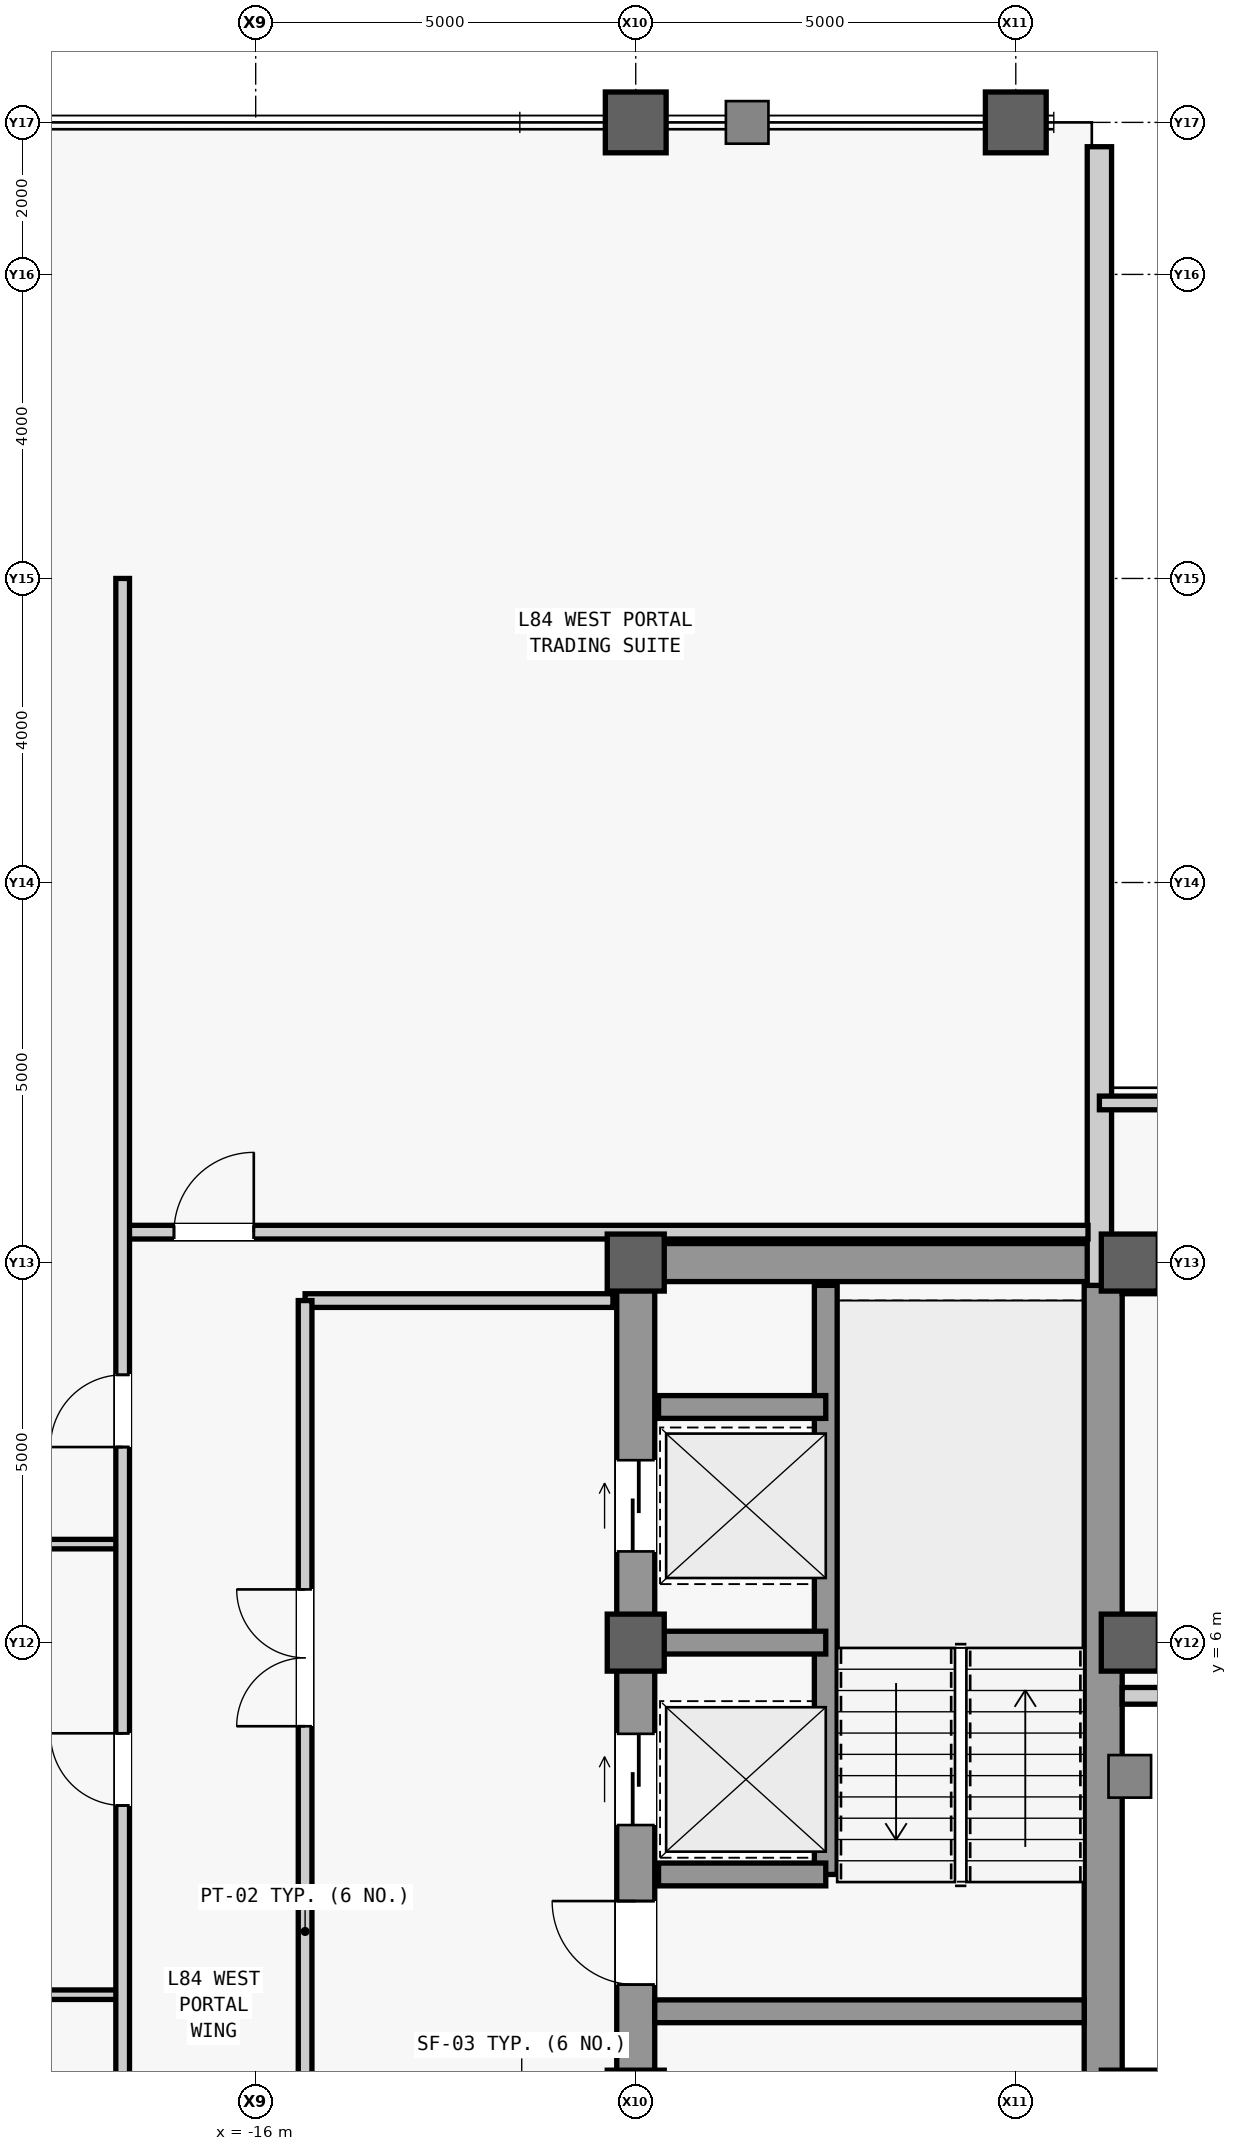
"""IFC4 building model, lengths in metres.
Left out: names, types, materials, properties, quantities, classifications, styles, units other than length and angle.
Written with IfcOpenShell. Run it as: python <this file> out.ifc"""

import sys

from ifc_helpers import new_model, si_unit, direction, frame, frame_2d, origin, origin_2d, place, context, subcontext, project, spatial, rectangle, hollow_rectangle, extrude, source, transform, mapped, element, fill, save


model = new_model("IFC4")
c1 = context("Model", 3, precision=1e-05, world=origin(), true_north=direction((0.0, 1.0)))
c2 = subcontext(c1, "Body", "Model", "MODEL_VIEW")
j1 = project(units=[si_unit("LENGTHUNIT", "METRE"), si_unit("PLANEANGLEUNIT", "RADIAN")], contexts=[c1])
p1 = place(None, origin())
s1 = spatial("IfcSite", under=j1, at=p1, CompositionType="ELEMENT")
p2 = place(p1, origin())
s2 = spatial("IfcBuilding", under=s1, at=p2, CompositionType="ELEMENT")
p3 = place(p2, frame((0.0, 0.0, 354.3)))
s3 = spatial("IfcBuildingStorey", under=s2, at=p3, CompositionType="ELEMENT", Elevation=354.3)
m1 = source(origin(), c2, "Body", "SweptSolid", [
    extrude(rectangle(XDim=22.0, YDim=0.5, at=frame_2d((11.0, 0.0))), origin(), (0.0, 0.0, 1.0), 3.74),
])
p4 = place(p3, frame((-11.0, -11.0, 0.0), z_axis=(0.0, 0.0, 1.0), x_axis=(0.0, 1.0, 0.0)))
e1 = element("IfcWall", 1, at=p4, inside=s3, PredefinedType="SHEAR", context=c2, shape_type="MappedRepresentation", body=[
    mapped(m1, transform((0.0, 0.0, 0.0), scale=1.0)),
])
m2 = source(origin(), c2, "Body", "SweptSolid", [
    extrude(rectangle(XDim=1.1, YDim=2.2, at=frame_2d((0.55, 1.1))), frame((0.0, 0.26, 0.0), z_axis=(0.0, -1.0, 0.0), x_axis=(1.0, 0.0, 0.0)), (0.0, 0.0, 1.0), 0.52),
])
p5 = place(p4, frame((0.8, 0.0, 0.0)))
e2 = element("IfcOpeningElement", 2, at=p5, cuts=e1, PredefinedType="OPENING", context=c2, shape_type="MappedRepresentation", body=[
    mapped(m2, transform((0.0, 0.0, 0.0), scale=1.0)),
])
p6 = place(p4, frame((12.5, 0.0, 0.0)))
e3 = element("IfcOpeningElement", 3, at=p6, cuts=e1, PredefinedType="OPENING", context=c2, shape_type="MappedRepresentation", body=[
    mapped(m2, transform((0.0, 0.0, 0.0), scale=1.0)),
])
m3 = source(origin(), c2, "Body", "SweptSolid", [
    extrude(rectangle(XDim=0.9, YDim=2.15, at=frame_2d((0.45, 1.075))), frame((0.0, 0.26, 0.0), z_axis=(0.0, -1.0, 0.0), x_axis=(1.0, 0.0, 0.0)), (0.0, 0.0, 1.0), 0.52),
])
p7 = place(p4, frame((7.575, 0.0, 0.0)))
e4 = element("IfcOpeningElement", 4, at=p7, cuts=e1, PredefinedType="OPENING", context=c2, shape_type="MappedRepresentation", body=[
    mapped(m3, transform((0.0, 0.0, 0.0), scale=1.0)),
])
m4 = source(origin(), c2, "Body", "SweptSolid", [
    extrude(rectangle(XDim=1.2, YDim=2.3, at=frame_2d((0.6, 1.15))), frame((0.0, 0.26, 0.0), z_axis=(0.0, -1.0, 0.0), x_axis=(1.0, 0.0, 0.0)), (0.0, 0.0, 1.0), 0.52),
])
p8 = place(p4, frame((14.6, 0.0, 0.0)))
e5 = element("IfcOpeningElement", 5, at=p8, cuts=e1, PredefinedType="OPENING", context=c2, shape_type="MappedRepresentation", body=[
    mapped(m4, transform((0.0, 0.0, 0.0), scale=1.0)),
])
p9 = place(p4, frame((18.2, 0.0, 0.0)))
e6 = element("IfcOpeningElement", 6, at=p9, cuts=e1, PredefinedType="OPENING", context=c2, shape_type="MappedRepresentation", body=[
    mapped(m4, transform((0.0, 0.0, 0.0), scale=1.0)),
])
m5 = source(origin(), c2, "Body", "SweptSolid", [
    extrude(rectangle(XDim=1.3, YDim=2.3, at=frame_2d((0.65, 1.15))), frame((0.0, 0.26, 0.0), z_axis=(0.0, -1.0, 0.0), x_axis=(1.0, 0.0, 0.0)), (0.0, 0.0, 1.0), 0.52),
])
p10 = place(p4, frame((2.7, 0.0, 0.0)))
e7 = element("IfcOpeningElement", 7, at=p10, cuts=e1, PredefinedType="OPENING", context=c2, shape_type="MappedRepresentation", body=[
    mapped(m5, transform((0.0, 0.0, 0.0), scale=1.0)),
])
m6 = source(origin(), c2, "Body", "SweptSolid", [
    extrude(rectangle(XDim=21.4, YDim=0.5, at=frame_2d((10.7, 0.0))), origin(), (0.0, 0.0, 1.0), 3.74),
])
p11 = place(p3, frame((-4.85, -10.7, 0.0), z_axis=(0.0, 0.0, 1.0), x_axis=(0.0, 1.0, 0.0)))
e8 = element("IfcWall", 8, at=p11, inside=s3, PredefinedType="SHEAR", context=c2, shape_type="MappedRepresentation", body=[
    mapped(m6, transform((0.0, 0.0, 0.0), scale=1.0)),
])
m7 = source(origin(), c2, "Body", "SweptSolid", [
    extrude(rectangle(XDim=5.9, YDim=0.5, at=frame_2d((2.95, 0.0))), origin(), (0.0, 0.0, 1.0), 3.74),
])
p12 = place(p3, frame((-10.75, 11.0, 0.0), z_axis=(0.0, 0.0, 1.0), x_axis=(1.0, 0.0, 0.0)))
e9 = element("IfcWall", 9, at=p12, inside=s3, PredefinedType="SHEAR", context=c2, shape_type="MappedRepresentation", body=[
    mapped(m7, transform((0.0, 0.0, 0.0), scale=1.0)),
])
m8 = source(origin(), c2, "Body", "SweptSolid", [
    extrude(rectangle(XDim=5.65, YDim=0.3, at=frame_2d((2.825, 0.0))), origin(), (0.0, 0.0, 1.0), 3.74),
])
p13 = place(p3, frame((-10.75, 1.15, 0.0), z_axis=(0.0, 0.0, 1.0), x_axis=(1.0, 0.0, 0.0)))
e10 = element("IfcWall", 10, at=p13, inside=s3, PredefinedType="SHEAR", context=c2, shape_type="MappedRepresentation", body=[
    mapped(m8, transform((0.0, 0.0, 0.0), scale=1.0)),
])
m9 = source(origin(), c2, "Body", "SweptSolid", [
    extrude(rectangle(XDim=0.75, YDim=0.75, at=origin_2d()), origin(), (0.0, 0.0, 1.0), 4.0),
])
for number, where, z_axis, x_axis in (
    (11, (-11.0, 0.0, 0.0), (0.0, 0.0, 1.0), (1.0, 0.0, 0.0)),
    (12, (-11.0, 6.0, 0.0), (0.0, 0.0, 1.0), (1.0, 0.0, 0.0)),
    (13, (-11.0, 11.0, 0.0), (0.0, 0.0, 1.0), (1.0, 0.0, 0.0)),
):
    element("IfcColumn", number, at=place(p3, frame(where, z_axis=z_axis, x_axis=x_axis)), inside=s3, PredefinedType="COLUMN", context=c2, shape_type="MappedRepresentation", body=[
        mapped(m9, transform((0.0, 0.0, 0.0), scale=1.0)),
    ])
m10 = source(origin(), c2, "Body", "SweptSolid", [
    extrude(hollow_rectangle(XDim=0.8, YDim=0.8, WallThickness=0.045, at=origin_2d()), origin(), (0.0, 0.0, 1.0), 4.0),
])
for number, where, z_axis, x_axis in (
    (14, (-11.0, 26.0, 0.0), (0.0, 0.0, 1.0), (1.0, 0.0, 0.0)),
    (15, (-6.0, 26.0, 0.0), (0.0, 0.0, 1.0), (1.0, 0.0, 0.0)),
):
    element("IfcColumn", number, at=place(p3, frame(where, z_axis=z_axis, x_axis=x_axis)), inside=s3, PredefinedType="COLUMN", context=c2, shape_type="MappedRepresentation", body=[
        mapped(m10, transform((0.0, 0.0, 0.0), scale=1.0)),
    ])
for number, where, z_axis, x_axis in (
    (16, (-4.5, 0.0, 0.0), (0.0, 0.0, 1.0), (1.0, 0.0, 0.0)),
    (17, (-4.5, 6.0, 0.0), (0.0, 0.0, 1.0), (1.0, 0.0, 0.0)),
    (18, (-4.5, 11.0, 0.0), (0.0, 0.0, 1.0), (1.0, 0.0, 0.0)),
):
    element("IfcColumn", number, at=place(p3, frame(where, z_axis=z_axis, x_axis=x_axis)), inside=s3, PredefinedType="COLUMN", context=c2, shape_type="MappedRepresentation", body=[
        mapped(m9, transform((0.0, 0.0, 0.0), scale=1.0)),
    ])
m11 = source(origin(), c2, "Body", "SweptSolid", [
    extrude(rectangle(XDim=14.98, YDim=0.32, at=frame_2d((7.49, 0.0))), origin(), (0.0, 0.0, 1.0), 3.045),
])
p14 = place(p3, frame((-4.9, 10.7, 0.0), z_axis=(0.0, 0.0, 1.0), x_axis=(0.0, 1.0, 0.0)))
e19 = element("IfcWall", 19, at=p14, inside=s3, PredefinedType="STANDARD", context=c2, shape_type="MappedRepresentation", body=[
    mapped(m11, transform((0.0, 0.0, 0.0), scale=1.0)),
])
m12 = source(origin(), c2, "Body", "SweptSolid", [
    extrude(rectangle(XDim=7.75, YDim=0.3, at=frame_2d((3.875, 0.0))), origin(), (0.0, 0.0, 1.0), 3.74),
])
p15 = place(p3, frame((-8.5, 2.95, 0.0), z_axis=(0.0, 0.0, 1.0), x_axis=(0.0, 1.0, 0.0)))
e20 = element("IfcWall", 20, at=p15, inside=s3, PredefinedType="SHEAR", context=c2, shape_type="MappedRepresentation", body=[
    mapped(m12, transform((0.0, 0.0, 0.0), scale=1.0)),
])
m13 = source(origin(), c2, "Body", "SweptSolid", [
    extrude(rectangle(XDim=2.2, YDim=0.3, at=frame_2d((1.1, 0.0))), origin(), (0.0, 0.0, 1.0), 3.74),
])
for number, where, z_axis, x_axis in (
    (21, (-10.7, 2.95, 0.0), (0.0, 0.0, 1.0), (1.0, 0.0, 0.0)),
    (22, (-10.7, 6.0, 0.0), (0.0, 0.0, 1.0), (1.0, 0.0, 0.0)),
    (23, (-10.7, 9.1, 0.0), (0.0, 0.0, 1.0), (1.0, 0.0, 0.0)),
):
    element("IfcWall", number, at=place(p3, frame(where, z_axis=z_axis, x_axis=x_axis)), inside=s3, PredefinedType="SHEAR", context=c2, shape_type="MappedRepresentation", body=[
        mapped(m13, transform((0.0, 0.0, 0.0), scale=1.0)),
    ])
m14 = source(origin(), c2, "Body", "SweptSolid", [
    extrude(rectangle(XDim=4.05, YDim=0.18, at=frame_2d((2.025, 0.0))), origin(), (0.0, 0.0, 1.0), 3.74),
])
p16 = place(p3, frame((-15.35, 10.5, 0.0), z_axis=(0.0, 0.0, 1.0), x_axis=(1.0, 0.0, 0.0)))
e24 = element("IfcWall", 24, at=p16, inside=s3, PredefinedType="PARTITIONING", context=c2, shape_type="MappedRepresentation", body=[
    mapped(m14, transform((0.0, 0.0, 0.0), scale=1.0)),
])
m15 = source(origin(), c2, "Body", "SweptSolid", [
    extrude(rectangle(XDim=16.6, YDim=0.18, at=frame_2d((8.3, 0.0))), origin(), (0.0, 0.0, 1.0), 3.74),
])
p17 = place(p3, frame((-15.35, -6.1, 0.0), z_axis=(0.0, 0.0, 1.0), x_axis=(0.0, 1.0, 0.0)))
e25 = element("IfcWall", 25, at=p17, inside=s3, PredefinedType="PARTITIONING", context=c2, shape_type="MappedRepresentation", body=[
    mapped(m15, transform((0.0, 0.0, 0.0), scale=1.0)),
])
m16 = source(origin(), c2, "Body", "SweptSolid", [
    extrude(rectangle(XDim=1.8, YDim=2.25, at=frame_2d((0.9, 1.125))), frame((0.0, 0.1, 0.0), z_axis=(0.0, -1.0, 0.0), x_axis=(1.0, 0.0, 0.0)), (0.0, 0.0, 1.0), 0.2),
])
p18 = place(p17, frame((2.7, 0.0, 0.0)))
e26 = element("IfcOpeningElement", 26, at=p18, cuts=e25, PredefinedType="OPENING", context=c2, shape_type="MappedRepresentation", body=[
    mapped(m16, transform((0.0, 0.0, 0.0), scale=1.0)),
])
p19 = place(p17, frame((11.0, 0.0, 0.0)))
e27 = element("IfcOpeningElement", 27, at=p19, cuts=e25, PredefinedType="OPENING", context=c2, shape_type="MappedRepresentation", body=[
    mapped(m16, transform((0.0, 0.0, 0.0), scale=1.0)),
])
m17 = source(origin(), c2, "Body", "SweptSolid", [
    extrude(rectangle(XDim=9.2, YDim=0.22, at=frame_2d((4.6, 0.0))), origin(), (0.0, 0.0, 1.0), 3.74),
])
p20 = place(p3, frame((-4.6, 5.3, 0.0), z_axis=(0.0, 0.0, 1.0), x_axis=(1.0, 0.0, 0.0)))
e28 = element("IfcWall", 28, at=p20, inside=s3, PredefinedType="PARTITIONING", context=c2, shape_type="MappedRepresentation", body=[
    mapped(m17, transform((0.0, 0.0, 0.0), scale=1.0)),
])
m18 = source(origin(), c2, "Body", "SweptSolid", [
    extrude(rectangle(XDim=9.2, YDim=0.22, at=frame_2d((4.6, 0.0))), origin(), (0.0, 0.0, 1.0), 2.79),
])
p21 = place(p3, frame((-4.6, 10.7, 0.0), z_axis=(0.0, 0.0, 1.0), x_axis=(1.0, 0.0, 0.0)))
e29 = element("IfcWall", 29, at=p21, inside=s3, PredefinedType="PARTITIONING", context=c2, shape_type="MappedRepresentation", body=[
    mapped(m18, transform((0.0, 0.0, 0.0), scale=1.0)),
])
m19 = source(origin(), c2, "Body", "SweptSolid", [
    extrude(rectangle(XDim=0.95, YDim=2.15, at=frame_2d((0.475, 1.075))), frame((0.0, 0.12, 0.0), z_axis=(0.0, -1.0, 0.0), x_axis=(1.0, 0.0, 0.0)), (0.0, 0.0, 1.0), 0.24),
])
p22 = place(p21, frame((2.575, 0.0, 0.0)))
e30 = element("IfcOpeningElement", 30, at=p22, cuts=e29, PredefinedType="OPENING", context=c2, shape_type="MappedRepresentation", body=[
    mapped(m19, transform((0.0, 0.0, 0.0), scale=1.0)),
])
p23 = place(p21, frame((7.175, 0.0, 0.0)))
e31 = element("IfcOpeningElement", 31, at=p23, cuts=e29, PredefinedType="OPENING", context=c2, shape_type="MappedRepresentation", body=[
    mapped(m19, transform((0.0, 0.0, 0.0), scale=1.0)),
])
m20 = source(origin(), c2, "Body", "SweptSolid", [
    extrude(rectangle(XDim=9.95, YDim=0.18, at=frame_2d((4.975, 0.0))), origin(), (0.0, 0.0, 1.0), 3.74),
])
p24 = place(p3, frame((-4.9, 13.1, 0.0), z_axis=(0.0, 0.0, 1.0), x_axis=(1.0, 0.0, 0.0)))
e32 = element("IfcWall", 32, at=p24, inside=s3, PredefinedType="PARTITIONING", context=c2, shape_type="MappedRepresentation", body=[
    mapped(m20, transform((0.0, 0.0, 0.0), scale=1.0)),
])
m21 = source(origin(), c2, "Body", "SweptSolid", [
    extrude(rectangle(XDim=12.7, YDim=0.18, at=frame_2d((6.35, 0.0))), origin(), (0.0, 0.0, 1.0), 2.79),
])
p25 = place(p3, frame((-17.75, 11.4, 0.0), z_axis=(0.0, 0.0, 1.0), x_axis=(1.0, 0.0, 0.0)))
e33 = element("IfcWall", 33, at=p25, inside=s3, PredefinedType="PARTITIONING", context=c2, shape_type="MappedRepresentation", body=[
    mapped(m21, transform((0.0, 0.0, 0.0), scale=1.0)),
])
m22 = source(origin(), c2, "Body", "SweptSolid", [
    extrude(rectangle(XDim=1.05, YDim=2.2, at=frame_2d((0.525, 1.1))), frame((0.0, 0.1, 0.0), z_axis=(0.0, -1.0, 0.0), x_axis=(1.0, 0.0, 0.0)), (0.0, 0.0, 1.0), 0.2),
])
p26 = place(p25, frame((0.675, 0.0, 0.0)))
e34 = element("IfcOpeningElement", 34, at=p26, cuts=e33, PredefinedType="OPENING", context=c2, shape_type="MappedRepresentation", body=[
    mapped(m22, transform((0.0, 0.0, 0.0), scale=1.0)),
])
m23 = source(origin(), c2, "Body", "SweptSolid", [
    extrude(rectangle(XDim=8.25, YDim=0.125, at=frame_2d((4.125, 0.0))), origin(), (0.0, 0.0, 1.0), 3.74),
])
for number, where, z_axis, x_axis in (
    (35, (-26.0, 1.368, 0.0), (0.0, 0.0, 1.0), (1.0, 0.0, 0.0)),
    (36, (-26.0, 7.296, 0.0), (0.0, 0.0, 1.0), (1.0, 0.0, 0.0)),
):
    element("IfcWall", number, at=place(p3, frame(where, z_axis=z_axis, x_axis=x_axis)), inside=s3, PredefinedType="PARTITIONING", context=c2, shape_type="MappedRepresentation", body=[
        mapped(m23, transform((0.0, 0.0, 0.0), scale=1.0)),
    ])
m24 = source(origin(), c2, "Body", "SweptSolid", [
    extrude(rectangle(XDim=40.0, YDim=0.18, at=frame_2d((20.0, 0.0))), origin(), (0.0, 0.0, 1.0), 3.74),
])
p27 = place(p3, frame((-17.75, -20.0, 0.0), z_axis=(0.0, 0.0, 1.0), x_axis=(0.0, 1.0, 0.0)))
e37 = element("IfcWall", 37, at=p27, inside=s3, PredefinedType="PARTITIONING", context=c2, shape_type="MappedRepresentation", body=[
    mapped(m24, transform((0.0, 0.0, 0.0), scale=1.0)),
])
m25 = source(origin(), c2, "Body", "SweptSolid", [
    extrude(rectangle(XDim=0.95, YDim=2.15, at=frame_2d((0.475, 1.075))), frame((0.0, 0.1, 0.0), z_axis=(0.0, -1.0, 0.0), x_axis=(1.0, 0.0, 0.0)), (0.0, 0.0, 1.0), 0.2),
])
p28 = place(p27, frame((11.389, 0.0, 0.0)))
e38 = element("IfcOpeningElement", 38, at=p28, cuts=e37, PredefinedType="OPENING", context=c2, shape_type="MappedRepresentation", body=[
    mapped(m25, transform((0.0, 0.0, 0.0), scale=1.0)),
])
p29 = place(p27, frame((17.473, 0.0, 0.0)))
e39 = element("IfcOpeningElement", 39, at=p29, cuts=e37, PredefinedType="OPENING", context=c2, shape_type="MappedRepresentation", body=[
    mapped(m25, transform((0.0, 0.0, 0.0), scale=1.0)),
])
p30 = place(p27, frame((23.857, 0.0, 0.0)))
e40 = element("IfcOpeningElement", 40, at=p30, cuts=e37, PredefinedType="OPENING", context=c2, shape_type="MappedRepresentation", body=[
    mapped(m25, transform((0.0, 0.0, 0.0), scale=1.0)),
])
p31 = place(p27, frame((28.573, 0.0, 0.0)))
e41 = element("IfcOpeningElement", 41, at=p31, cuts=e37, PredefinedType="OPENING", context=c2, shape_type="MappedRepresentation", body=[
    mapped(m25, transform((0.0, 0.0, 0.0), scale=1.0)),
])
m26 = source(origin(), c2, "Body", "SweptSolid", [
    extrude(rectangle(XDim=1.1, YDim=2.2, at=frame_2d((0.55, 1.1))), frame((0.0, 0.025, 0.0), z_axis=(0.0, -1.0, 0.0), x_axis=(1.0, 0.0, 0.0)), (0.0, 0.0, 1.0), 0.05),
])
p32 = place(p6, origin())
e42 = element("IfcDoor", 42, at=p32, inside=s3, OperationType="SINGLE_SWING_RIGHT", PredefinedType="DOOR", context=c2, shape_type="MappedRepresentation", body=[
    mapped(m26, transform((0.0, 0.0, 0.0), scale=1.0)),
])
fill(e3, e42)
m27 = source(origin(), c2, "Body", "SweptSolid", [
    extrude(rectangle(XDim=1.8, YDim=2.25, at=frame_2d((0.9, 1.125))), frame((0.0, 0.025, 0.0), z_axis=(0.0, -1.0, 0.0), x_axis=(1.0, 0.0, 0.0)), (0.0, 0.0, 1.0), 0.05),
])
p33 = place(p19, origin())
e43 = element("IfcDoor", 43, at=p33, inside=s3, OperationType="SINGLE_SWING_RIGHT", PredefinedType="DOOR", context=c2, shape_type="MappedRepresentation", body=[
    mapped(m27, transform((0.0, 0.0, 0.0), scale=1.0)),
])
fill(e27, e43)
m28 = source(origin(), c2, "Body", "SweptSolid", [
    extrude(rectangle(XDim=1.05, YDim=2.2, at=frame_2d((0.525, 1.1))), frame((0.0, 0.025, 0.0), z_axis=(0.0, -1.0, 0.0), x_axis=(1.0, 0.0, 0.0)), (0.0, 0.0, 1.0), 0.05),
])
p34 = place(p26, origin())
e44 = element("IfcDoor", 44, at=p34, inside=s3, OperationType="SINGLE_SWING_RIGHT", PredefinedType="DOOR", context=c2, shape_type="MappedRepresentation", body=[
    mapped(m28, transform((0.0, 0.0, 0.0), scale=1.0)),
])
fill(e34, e44)
m29 = source(origin(), c2, "Body", "SweptSolid", [
    extrude(rectangle(XDim=0.95, YDim=2.15, at=frame_2d((0.475, 1.075))), frame((0.0, 0.025, 0.0), z_axis=(0.0, -1.0, 0.0), x_axis=(1.0, 0.0, 0.0)), (0.0, 0.0, 1.0), 0.05),
])
p35 = place(p30, origin())
e45 = element("IfcDoor", 45, at=p35, inside=s3, OperationType="SINGLE_SWING_RIGHT", PredefinedType="DOOR", context=c2, shape_type="MappedRepresentation", body=[
    mapped(m29, transform((0.0, 0.0, 0.0), scale=1.0)),
])
fill(e40, e45)
p36 = place(p31, origin())
e46 = element("IfcDoor", 46, at=p36, inside=s3, OperationType="SINGLE_SWING_LEFT", PredefinedType="DOOR", context=c2, shape_type="MappedRepresentation", body=[
    mapped(m29, transform((0.0, 0.0, 0.0), scale=1.0)),
])
fill(e41, e46)
m30 = source(origin(), c2, "Body", "SweptSolid", [
    extrude(rectangle(XDim=1.2, YDim=2.3, at=frame_2d((0.6, 1.15))), frame((0.0, 0.025, 0.0), z_axis=(0.0, -1.0, 0.0), x_axis=(1.0, 0.0, 0.0)), (0.0, 0.0, 1.0), 0.05),
])
p37 = place(p8, origin())
e47 = element("IfcDoor", 47, at=p37, inside=s3, OperationType="SLIDING_TO_LEFT", PredefinedType="DOOR", context=c2, shape_type="MappedRepresentation", body=[
    mapped(m30, transform((0.0, 0.0, 0.0), scale=1.0)),
])
fill(e5, e47)
p38 = place(p9, origin())
e48 = element("IfcDoor", 48, at=p38, inside=s3, OperationType="SLIDING_TO_LEFT", PredefinedType="DOOR", context=c2, shape_type="MappedRepresentation", body=[
    mapped(m30, transform((0.0, 0.0, 0.0), scale=1.0)),
])
fill(e6, e48)
save(model, sys.argv[1])
